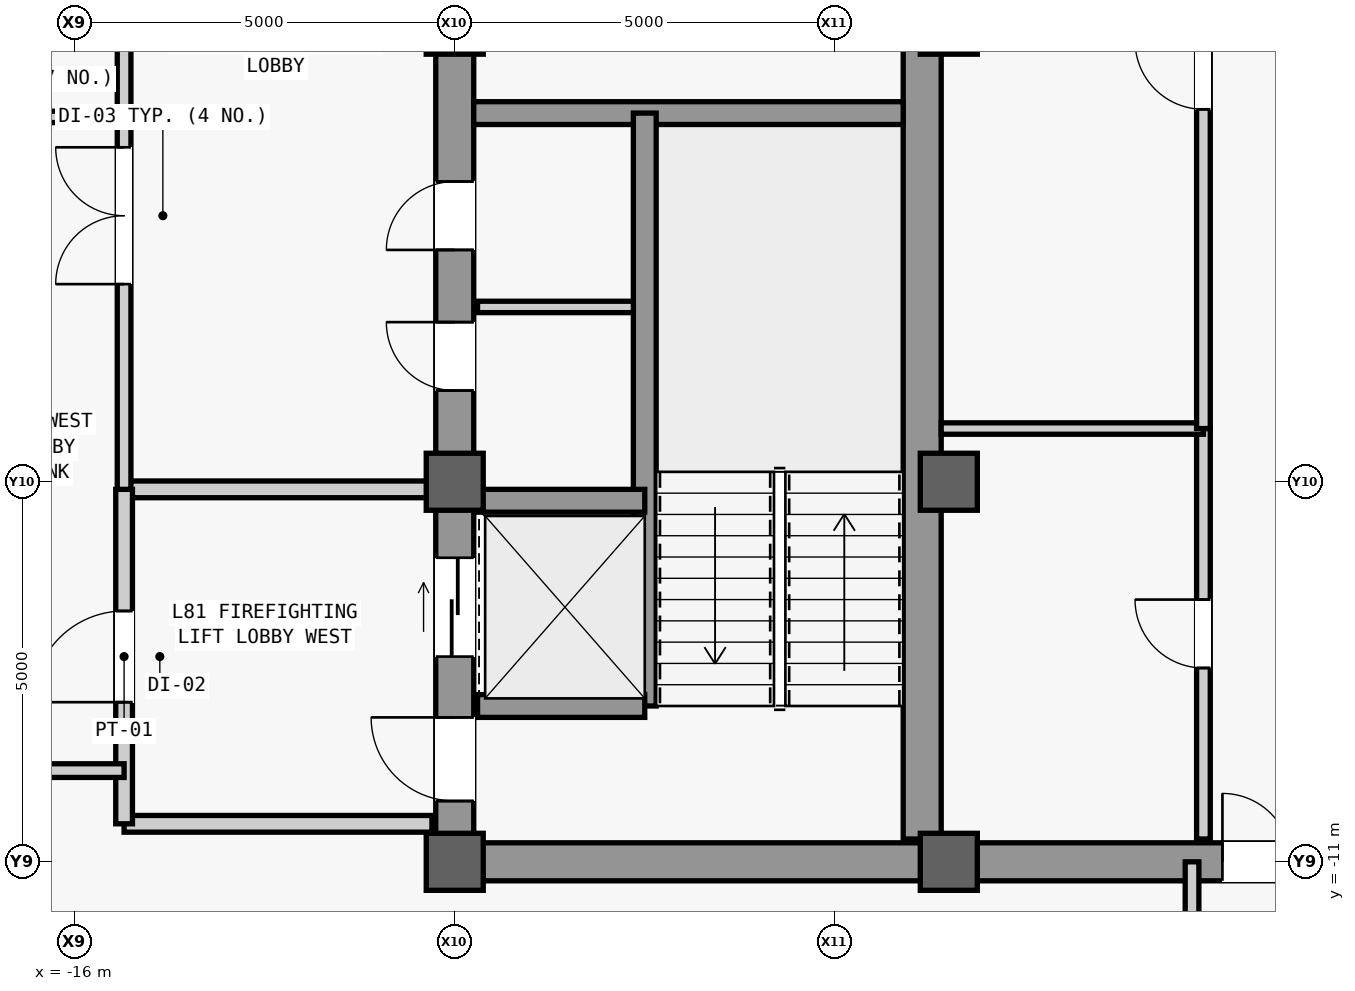
"""IFC4 building model, lengths in metres.
Left out: names, types, materials, properties, quantities, classifications, styles, units other than length and angle.
Written with IfcOpenShell. Run it as: python <this file> out.ifc"""

import sys

from ifc_helpers import new_model, si_unit, direction, frame, frame_2d, origin, origin_2d, place, context, subcontext, project, spatial, rectangle, extrude, source, transform, mapped, element, fill, save


model = new_model("IFC4")
c1 = context("Model", 3, precision=1e-05, world=origin(), true_north=direction((0.0, 1.0)))
c2 = subcontext(c1, "Body", "Model", "MODEL_VIEW")
j1 = project(units=[si_unit("LENGTHUNIT", "METRE"), si_unit("PLANEANGLEUNIT", "RADIAN")], contexts=[c1])
p1 = place(None, origin())
s1 = spatial("IfcSite", under=j1, at=p1, CompositionType="ELEMENT")
p2 = place(p1, origin())
s2 = spatial("IfcBuilding", under=s1, at=p2, CompositionType="ELEMENT")
p3 = place(p2, frame((0.0, 0.0, 342.3)))
s3 = spatial("IfcBuildingStorey", under=s2, at=p3, CompositionType="ELEMENT", Elevation=342.3)
m1 = source(origin(), c2, "Body", "SweptSolid", [
    extrude(rectangle(XDim=22.0, YDim=0.5, at=frame_2d((11.0, 0.0))), origin(), (0.0, 0.0, 1.0), 3.7),
])
p4 = place(p3, frame((-11.0, -11.0, 0.0), z_axis=(0.0, 0.0, 1.0), x_axis=(0.0, 1.0, 0.0)))
e1 = element("IfcWall", 1, at=p4, inside=s3, PredefinedType="SHEAR", context=c2, shape_type="MappedRepresentation", body=[
    mapped(m1, transform((0.0, 0.0, 0.0), scale=1.0)),
])
m2 = source(origin(), c2, "Body", "SweptSolid", [
    extrude(rectangle(XDim=1.1, YDim=2.2, at=frame_2d((0.55, 1.1))), frame((0.0, 0.26, 0.0), z_axis=(0.0, -1.0, 0.0), x_axis=(1.0, 0.0, 0.0)), (0.0, 0.0, 1.0), 0.52),
])
p5 = place(p4, frame((0.8, 0.0, 0.0)))
e2 = element("IfcOpeningElement", 2, at=p5, cuts=e1, PredefinedType="OPENING", context=c2, shape_type="MappedRepresentation", body=[
    mapped(m2, transform((0.0, 0.0, 0.0), scale=1.0)),
])
p6 = place(p4, frame((12.5, 0.0, 0.0)))
e3 = element("IfcOpeningElement", 3, at=p6, cuts=e1, PredefinedType="OPENING", context=c2, shape_type="MappedRepresentation", body=[
    mapped(m2, transform((0.0, 0.0, 0.0), scale=1.0)),
])
m3 = source(origin(), c2, "Body", "SweptSolid", [
    extrude(rectangle(XDim=0.9, YDim=2.15, at=frame_2d((0.45, 1.075))), frame((0.0, 0.26, 0.0), z_axis=(0.0, -1.0, 0.0), x_axis=(1.0, 0.0, 0.0)), (0.0, 0.0, 1.0), 0.52),
])
p7 = place(p4, frame((6.2, 0.0, 0.0)))
e4 = element("IfcOpeningElement", 4, at=p7, cuts=e1, PredefinedType="OPENING", context=c2, shape_type="MappedRepresentation", body=[
    mapped(m3, transform((0.0, 0.0, 0.0), scale=1.0)),
])
p8 = place(p4, frame((8.05, 0.0, 0.0)))
e5 = element("IfcOpeningElement", 5, at=p8, cuts=e1, PredefinedType="OPENING", context=c2, shape_type="MappedRepresentation", body=[
    mapped(m3, transform((0.0, 0.0, 0.0), scale=1.0)),
])
m4 = source(origin(), c2, "Body", "SweptSolid", [
    extrude(rectangle(XDim=1.2, YDim=2.3, at=frame_2d((0.6, 1.15))), frame((0.0, 0.26, 0.0), z_axis=(0.0, -1.0, 0.0), x_axis=(1.0, 0.0, 0.0)), (0.0, 0.0, 1.0), 0.52),
])
p9 = place(p4, frame((14.6, 0.0, 0.0)))
e6 = element("IfcOpeningElement", 6, at=p9, cuts=e1, PredefinedType="OPENING", context=c2, shape_type="MappedRepresentation", body=[
    mapped(m4, transform((0.0, 0.0, 0.0), scale=1.0)),
])
p10 = place(p4, frame((18.2, 0.0, 0.0)))
e7 = element("IfcOpeningElement", 7, at=p10, cuts=e1, PredefinedType="OPENING", context=c2, shape_type="MappedRepresentation", body=[
    mapped(m4, transform((0.0, 0.0, 0.0), scale=1.0)),
])
m5 = source(origin(), c2, "Body", "SweptSolid", [
    extrude(rectangle(XDim=1.3, YDim=2.3, at=frame_2d((0.65, 1.15))), frame((0.0, 0.26, 0.0), z_axis=(0.0, -1.0, 0.0), x_axis=(1.0, 0.0, 0.0)), (0.0, 0.0, 1.0), 0.52),
])
p11 = place(p4, frame((2.7, 0.0, 0.0)))
e8 = element("IfcOpeningElement", 8, at=p11, cuts=e1, PredefinedType="OPENING", context=c2, shape_type="MappedRepresentation", body=[
    mapped(m5, transform((0.0, 0.0, 0.0), scale=1.0)),
])
m6 = source(origin(), c2, "Body", "SweptSolid", [
    extrude(rectangle(XDim=21.4, YDim=0.5, at=frame_2d((10.7, 0.0))), origin(), (0.0, 0.0, 1.0), 3.7),
])
p12 = place(p3, frame((-4.85, -10.7, 0.0), z_axis=(0.0, 0.0, 1.0), x_axis=(0.0, 1.0, 0.0)))
e9 = element("IfcWall", 9, at=p12, inside=s3, PredefinedType="SHEAR", context=c2, shape_type="MappedRepresentation", body=[
    mapped(m6, transform((0.0, 0.0, 0.0), scale=1.0)),
])
m7 = source(origin(), c2, "Body", "SweptSolid", [
    extrude(rectangle(XDim=5.9, YDim=0.5, at=frame_2d((2.95, 0.0))), origin(), (0.0, 0.0, 1.0), 3.7),
])
p13 = place(p3, frame((-10.75, -11.0, 0.0), z_axis=(0.0, 0.0, 1.0), x_axis=(1.0, 0.0, 0.0)))
e10 = element("IfcWall", 10, at=p13, inside=s3, PredefinedType="SHEAR", context=c2, shape_type="MappedRepresentation", body=[
    mapped(m7, transform((0.0, 0.0, 0.0), scale=1.0)),
])
m8 = source(origin(), c2, "Body", "SweptSolid", [
    extrude(rectangle(XDim=5.65, YDim=0.3, at=frame_2d((2.825, 0.0))), origin(), (0.0, 0.0, 1.0), 3.7),
])
p14 = place(p3, frame((-10.75, -1.15, 0.0), z_axis=(0.0, 0.0, 1.0), x_axis=(1.0, 0.0, 0.0)))
e11 = element("IfcWall", 11, at=p14, inside=s3, PredefinedType="SHEAR", context=c2, shape_type="MappedRepresentation", body=[
    mapped(m8, transform((0.0, 0.0, 0.0), scale=1.0)),
])
m9 = source(origin(), c2, "Body", "SweptSolid", [
    extrude(rectangle(XDim=9.2, YDim=0.5, at=frame_2d((4.6, 0.0))), origin(), (0.0, 0.0, 1.0), 3.7),
])
p15 = place(p3, frame((-4.6, -11.0, 0.0), z_axis=(0.0, 0.0, 1.0), x_axis=(1.0, 0.0, 0.0)))
e12 = element("IfcWall", 12, at=p15, inside=s3, PredefinedType="SHEAR", context=c2, shape_type="MappedRepresentation", body=[
    mapped(m9, transform((0.0, 0.0, 0.0), scale=1.0)),
])
m10 = source(origin(), c2, "Body", "SweptSolid", [
    extrude(rectangle(XDim=1.8, YDim=2.25, at=frame_2d((0.9, 1.125))), frame((0.0, 0.26, 0.0), z_axis=(0.0, -1.0, 0.0), x_axis=(1.0, 0.0, 0.0)), (0.0, 0.0, 1.0), 0.52),
])
p16 = place(p15, frame((3.7, 0.0, 0.0)))
e13 = element("IfcOpeningElement", 13, at=p16, cuts=e12, PredefinedType="OPENING", context=c2, shape_type="MappedRepresentation", body=[
    mapped(m10, transform((0.0, 0.0, 0.0), scale=1.0)),
])
m11 = source(origin(), c2, "Body", "SweptSolid", [
    extrude(rectangle(XDim=0.75, YDim=0.75, at=origin_2d()), origin(), (0.0, 0.0, 1.0), 4.0),
])
for number, where, z_axis, x_axis in (
    (14, (-11.0, -11.0, 0.0), (0.0, 0.0, 1.0), (1.0, 0.0, 0.0)),
    (15, (-11.0, -6.0, 0.0), (0.0, 0.0, 1.0), (1.0, 0.0, 0.0)),
    (16, (-11.0, 0.0, 0.0), (0.0, 0.0, 1.0), (1.0, 0.0, 0.0)),
    (17, (-4.5, -11.0, 0.0), (0.0, 0.0, 1.0), (1.0, 0.0, 0.0)),
    (18, (-4.5, -6.0, 0.0), (0.0, 0.0, 1.0), (1.0, 0.0, 0.0)),
    (19, (-4.5, 0.0, 0.0), (0.0, 0.0, 1.0), (1.0, 0.0, 0.0)),
):
    element("IfcColumn", number, at=place(p3, frame(where, z_axis=z_axis, x_axis=x_axis)), inside=s3, PredefinedType="COLUMN", context=c2, shape_type="MappedRepresentation", body=[
        mapped(m11, transform((0.0, 0.0, 0.0), scale=1.0)),
    ])
m12 = source(origin(), c2, "Body", "SweptSolid", [
    extrude(rectangle(XDim=7.8, YDim=0.3, at=frame_2d((3.9, 0.0))), origin(), (0.0, 0.0, 1.0), 3.7),
])
p17 = place(p3, frame((-8.5, -8.95, 0.0), z_axis=(0.0, 0.0, 1.0), x_axis=(0.0, 1.0, 0.0)))
e20 = element("IfcWall", 20, at=p17, inside=s3, PredefinedType="SHEAR", context=c2, shape_type="MappedRepresentation", body=[
    mapped(m12, transform((0.0, 0.0, 0.0), scale=1.0)),
])
m13 = source(origin(), c2, "Body", "SweptSolid", [
    extrude(rectangle(XDim=2.2, YDim=0.3, at=frame_2d((1.1, 0.0))), origin(), (0.0, 0.0, 1.0), 3.7),
])
for number, where, z_axis, x_axis in (
    (21, (-10.7, -8.95, 0.0), (0.0, 0.0, 1.0), (1.0, 0.0, 0.0)),
    (22, (-10.7, -6.25, 0.0), (0.0, 0.0, 1.0), (1.0, 0.0, 0.0)),
):
    element("IfcWall", number, at=place(p3, frame(where, z_axis=z_axis, x_axis=x_axis)), inside=s3, PredefinedType="SHEAR", context=c2, shape_type="MappedRepresentation", body=[
        mapped(m13, transform((0.0, 0.0, 0.0), scale=1.0)),
    ])
m14 = source(origin(), c2, "Body", "SweptSolid", [
    extrude(rectangle(XDim=2.05, YDim=0.15, at=frame_2d((1.025, 0.0))), origin(), (0.0, 0.0, 1.0), 3.7),
])
p18 = place(p3, frame((-10.7, -3.7, 0.0), z_axis=(0.0, 0.0, 1.0), x_axis=(1.0, 0.0, 0.0)))
e23 = element("IfcWall", 23, at=p18, inside=s3, PredefinedType="PARTITIONING", context=c2, shape_type="MappedRepresentation", body=[
    mapped(m14, transform((0.0, 0.0, 0.0), scale=1.0)),
])
m15 = source(origin(), c2, "Body", "SweptSolid", [
    extrude(rectangle(XDim=4.05, YDim=0.22, at=frame_2d((2.025, 0.0))), origin(), (0.0, 0.0, 1.0), 3.7),
])
p19 = place(p3, frame((-15.35, -10.5, 0.0), z_axis=(0.0, 0.0, 1.0), x_axis=(1.0, 0.0, 0.0)))
e24 = element("IfcWall", 24, at=p19, inside=s3, PredefinedType="PARTITIONING", context=c2, shape_type="MappedRepresentation", body=[
    mapped(m15, transform((0.0, 0.0, 0.0), scale=1.0)),
])
m16 = source(origin(), c2, "Body", "SweptSolid", [
    extrude(rectangle(XDim=4.05, YDim=0.22, at=frame_2d((2.025, 0.0))), origin(), (0.0, 0.0, 1.0), 3.084),
])
p20 = place(p3, frame((-15.35, -6.1, 0.0), z_axis=(0.0, 0.0, 1.0), x_axis=(1.0, 0.0, 0.0)))
e25 = element("IfcWall", 25, at=p20, inside=s3, PredefinedType="PARTITIONING", context=c2, shape_type="MappedRepresentation", body=[
    mapped(m16, transform((0.0, 0.0, 0.0), scale=1.0)),
])
m17 = source(origin(), c2, "Body", "SweptSolid", [
    extrude(rectangle(XDim=4.4, YDim=0.22, at=frame_2d((2.2, 0.0))), origin(), (0.0, 0.0, 1.0), 3.7),
])
p21 = place(p3, frame((-15.35, -10.5, 0.0), z_axis=(0.0, 0.0, 1.0), x_axis=(0.0, 1.0, 0.0)))
e26 = element("IfcWall", 26, at=p21, inside=s3, PredefinedType="PARTITIONING", context=c2, shape_type="MappedRepresentation", body=[
    mapped(m17, transform((0.0, 0.0, 0.0), scale=1.0)),
])
m18 = source(origin(), c2, "Body", "SweptSolid", [
    extrude(rectangle(XDim=1.2, YDim=2.2, at=frame_2d((0.6, 1.1))), frame((0.0, 0.12, 0.0), z_axis=(0.0, -1.0, 0.0), x_axis=(1.0, 0.0, 0.0)), (0.0, 0.0, 1.0), 0.24),
])
p22 = place(p21, frame((1.6, 0.0, 0.0)))
e27 = element("IfcOpeningElement", 27, at=p22, cuts=e26, PredefinedType="OPENING", context=c2, shape_type="MappedRepresentation", body=[
    mapped(m18, transform((0.0, 0.0, 0.0), scale=1.0)),
])
m19 = source(origin(), c2, "Body", "SweptSolid", [
    extrude(rectangle(XDim=16.6, YDim=0.18, at=frame_2d((8.3, 0.0))), origin(), (0.0, 0.0, 1.0), 3.7),
])
p23 = place(p3, frame((-15.35, -6.1, 0.0), z_axis=(0.0, 0.0, 1.0), x_axis=(0.0, 1.0, 0.0)))
e28 = element("IfcWall", 28, at=p23, inside=s3, PredefinedType="PARTITIONING", context=c2, shape_type="MappedRepresentation", body=[
    mapped(m19, transform((0.0, 0.0, 0.0), scale=1.0)),
])
m20 = source(origin(), c2, "Body", "SweptSolid", [
    extrude(rectangle(XDim=1.8, YDim=2.25, at=frame_2d((0.9, 1.125))), frame((0.0, 0.1, 0.0), z_axis=(0.0, -1.0, 0.0), x_axis=(1.0, 0.0, 0.0)), (0.0, 0.0, 1.0), 0.2),
])
p24 = place(p23, frame((2.7, 0.0, 0.0)))
e29 = element("IfcOpeningElement", 29, at=p24, cuts=e28, PredefinedType="OPENING", context=c2, shape_type="MappedRepresentation", body=[
    mapped(m20, transform((0.0, 0.0, 0.0), scale=1.0)),
])
p25 = place(p23, frame((11.0, 0.0, 0.0)))
e30 = element("IfcOpeningElement", 30, at=p25, cuts=e28, PredefinedType="OPENING", context=c2, shape_type="MappedRepresentation", body=[
    mapped(m20, transform((0.0, 0.0, 0.0), scale=1.0)),
])
m21 = source(origin(), c2, "Body", "SweptSolid", [
    extrude(rectangle(XDim=5.4, YDim=0.18, at=frame_2d((2.7, 0.0))), origin(), (0.0, 0.0, 1.0), 3.7),
])
p26 = place(p3, frame((-1.15, -10.7, 0.0), z_axis=(0.0, 0.0, 1.0), x_axis=(0.0, 1.0, 0.0)))
e31 = element("IfcWall", 31, at=p26, inside=s3, PredefinedType="PARTITIONING", context=c2, shape_type="MappedRepresentation", body=[
    mapped(m21, transform((0.0, 0.0, 0.0), scale=1.0)),
])
m22 = source(origin(), c2, "Body", "SweptSolid", [
    extrude(rectangle(XDim=0.9, YDim=2.15, at=frame_2d((0.45, 1.075))), frame((0.0, 0.1, 0.0), z_axis=(0.0, -1.0, 0.0), x_axis=(1.0, 0.0, 0.0)), (0.0, 0.0, 1.0), 0.2),
])
p27 = place(p26, frame((2.25, 0.0, 0.0)))
e32 = element("IfcOpeningElement", 32, at=p27, cuts=e31, PredefinedType="OPENING", context=c2, shape_type="MappedRepresentation", body=[
    mapped(m22, transform((0.0, 0.0, 0.0), scale=1.0)),
])
m23 = source(origin(), c2, "Body", "SweptSolid", [
    extrude(rectangle(XDim=3.45, YDim=0.15, at=frame_2d((1.725, 0.0))), origin(), (0.0, 0.0, 1.0), 3.7),
])
p28 = place(p3, frame((-4.6, -5.3, 0.0), z_axis=(0.0, 0.0, 1.0), x_axis=(1.0, 0.0, 0.0)))
e33 = element("IfcWall", 33, at=p28, inside=s3, PredefinedType="PARTITIONING", context=c2, shape_type="MappedRepresentation", body=[
    mapped(m23, transform((0.0, 0.0, 0.0), scale=1.0)),
])
m24 = source(origin(), c2, "Body", "SweptSolid", [
    extrude(rectangle(XDim=10.6, YDim=0.18, at=frame_2d((5.3, 0.0))), origin(), (0.0, 0.0, 1.0), 3.7),
])
p29 = place(p3, frame((-1.15, -5.3, 0.0), z_axis=(0.0, 0.0, 1.0), x_axis=(0.0, 1.0, 0.0)))
e34 = element("IfcWall", 34, at=p29, inside=s3, PredefinedType="PARTITIONING", context=c2, shape_type="MappedRepresentation", body=[
    mapped(m24, transform((0.0, 0.0, 0.0), scale=1.0)),
])
p30 = place(p29, frame((4.2, 0.0, 0.0)))
e35 = element("IfcOpeningElement", 35, at=p30, cuts=e34, PredefinedType="OPENING", context=c2, shape_type="MappedRepresentation", body=[
    mapped(m22, transform((0.0, 0.0, 0.0), scale=1.0)),
])
p31 = place(p29, frame((9.475, 0.0, 0.0)))
e36 = element("IfcOpeningElement", 36, at=p31, cuts=e34, PredefinedType="OPENING", context=c2, shape_type="MappedRepresentation", body=[
    mapped(m22, transform((0.0, 0.0, 0.0), scale=1.0)),
])
m25 = source(origin(), c2, "Body", "SweptSolid", [
    extrude(rectangle(XDim=2.05, YDim=0.15, at=frame_2d((1.025, 0.0))), origin(), (0.0, 0.0, 1.0), 3.7),
])
p32 = place(p3, frame((-17.4, -1.2, 0.0), z_axis=(0.0, 0.0, 1.0), x_axis=(1.0, 0.0, 0.0)))
e37 = element("IfcWall", 37, at=p32, inside=s3, PredefinedType="PARTITIONING", context=c2, shape_type="MappedRepresentation", body=[
    mapped(m25, transform((0.0, 0.0, 0.0), scale=1.0)),
])
m26 = source(origin(), c2, "Body", "SweptSolid", [
    extrude(rectangle(XDim=2.05, YDim=0.18, at=frame_2d((1.025, 0.0))), origin(), (0.0, 0.0, 1.0), 3.7),
])
p33 = place(p3, frame((-17.4, -9.8, 0.0), z_axis=(0.0, 0.0, 1.0), x_axis=(1.0, 0.0, 0.0)))
e38 = element("IfcWall", 38, at=p33, inside=s3, PredefinedType="PARTITIONING", context=c2, shape_type="MappedRepresentation", body=[
    mapped(m26, transform((0.0, 0.0, 0.0), scale=1.0)),
])
m27 = source(origin(), c2, "Body", "SweptSolid", [
    extrude(rectangle(XDim=3.9, YDim=0.18, at=frame_2d((1.95, 0.0))), origin(), (0.0, 0.0, 1.0), 3.7),
])
p34 = place(p3, frame((-1.3, -14.9, 0.0), z_axis=(0.0, 0.0, 1.0), x_axis=(0.0, 1.0, 0.0)))
e39 = element("IfcWall", 39, at=p34, inside=s3, PredefinedType="PARTITIONING", context=c2, shape_type="MappedRepresentation", body=[
    mapped(m27, transform((0.0, 0.0, 0.0), scale=1.0)),
])
m28 = source(origin(), c2, "Body", "SweptSolid", [
    extrude(rectangle(XDim=1.1, YDim=2.2, at=frame_2d((0.55, 1.1))), frame((0.0, 0.025, 0.0), z_axis=(0.0, -1.0, 0.0), x_axis=(1.0, 0.0, 0.0)), (0.0, 0.0, 1.0), 0.05),
])
p35 = place(p5, origin())
e40 = element("IfcDoor", 40, at=p35, inside=s3, OperationType="SINGLE_SWING_RIGHT", PredefinedType="DOOR", context=c2, shape_type="MappedRepresentation", body=[
    mapped(m28, transform((0.0, 0.0, 0.0), scale=1.0)),
])
fill(e2, e40)
m29 = source(origin(), c2, "Body", "SweptSolid", [
    extrude(rectangle(XDim=0.9, YDim=2.15, at=frame_2d((0.45, 1.075))), frame((0.0, 0.025, 0.0), z_axis=(0.0, -1.0, 0.0), x_axis=(1.0, 0.0, 0.0)), (0.0, 0.0, 1.0), 0.05),
])
p36 = place(p7, origin())
e41 = element("IfcDoor", 41, at=p36, inside=s3, OperationType="SINGLE_SWING_RIGHT", PredefinedType="DOOR", context=c2, shape_type="MappedRepresentation", body=[
    mapped(m29, transform((0.0, 0.0, 0.0), scale=1.0)),
])
fill(e4, e41)
p37 = place(p8, origin())
e42 = element("IfcDoor", 42, at=p37, inside=s3, OperationType="SINGLE_SWING_LEFT", PredefinedType="DOOR", context=c2, shape_type="MappedRepresentation", body=[
    mapped(m29, transform((0.0, 0.0, 0.0), scale=1.0)),
])
fill(e5, e42)
m30 = source(origin(), c2, "Body", "SweptSolid", [
    extrude(rectangle(XDim=1.2, YDim=2.2, at=frame_2d((0.6, 1.1))), frame((0.0, 0.025, 0.0), z_axis=(0.0, -1.0, 0.0), x_axis=(1.0, 0.0, 0.0)), (0.0, 0.0, 1.0), 0.05),
])
p38 = place(p22, origin())
e43 = element("IfcDoor", 43, at=p38, inside=s3, OperationType="SINGLE_SWING_LEFT", PredefinedType="DOOR", context=c2, shape_type="MappedRepresentation", body=[
    mapped(m30, transform((0.0, 0.0, 0.0), scale=1.0)),
])
fill(e27, e43)
m31 = source(origin(), c2, "Body", "SweptSolid", [
    extrude(rectangle(XDim=1.8, YDim=2.25, at=frame_2d((0.9, 1.125))), frame((0.0, 0.025, 0.0), z_axis=(0.0, -1.0, 0.0), x_axis=(1.0, 0.0, 0.0)), (0.0, 0.0, 1.0), 0.05),
])
p39 = place(p24, origin())
e44 = element("IfcDoor", 44, at=p39, inside=s3, OperationType="SINGLE_SWING_LEFT", PredefinedType="DOOR", context=c2, shape_type="MappedRepresentation", body=[
    mapped(m31, transform((0.0, 0.0, 0.0), scale=1.0)),
])
fill(e29, e44)
p40 = place(p27, origin())
e45 = element("IfcDoor", 45, at=p40, inside=s3, OperationType="SINGLE_SWING_RIGHT", PredefinedType="DOOR", context=c2, shape_type="MappedRepresentation", body=[
    mapped(m29, transform((0.0, 0.0, 0.0), scale=1.0)),
])
fill(e32, e45)
p41 = place(p16, origin())
e46 = element("IfcDoor", 46, at=p41, inside=s3, OperationType="SINGLE_SWING_LEFT", PredefinedType="DOOR", context=c2, shape_type="MappedRepresentation", body=[
    mapped(m31, transform((0.0, 0.0, 0.0), scale=1.0)),
])
fill(e13, e46)
p42 = place(p30, origin())
e47 = element("IfcDoor", 47, at=p42, inside=s3, OperationType="SINGLE_SWING_RIGHT", PredefinedType="DOOR", context=c2, shape_type="MappedRepresentation", body=[
    mapped(m29, transform((0.0, 0.0, 0.0), scale=1.0)),
])
fill(e35, e47)
m32 = source(origin(), c2, "Body", "SweptSolid", [
    extrude(rectangle(XDim=1.3, YDim=2.3, at=frame_2d((0.65, 1.15))), frame((0.0, 0.025, 0.0), z_axis=(0.0, -1.0, 0.0), x_axis=(1.0, 0.0, 0.0)), (0.0, 0.0, 1.0), 0.05),
])
p43 = place(p11, origin())
e48 = element("IfcDoor", 48, at=p43, inside=s3, OperationType="SLIDING_TO_LEFT", PredefinedType="DOOR", context=c2, shape_type="MappedRepresentation", body=[
    mapped(m32, transform((0.0, 0.0, 0.0), scale=1.0)),
])
fill(e8, e48)
save(model, sys.argv[1])
